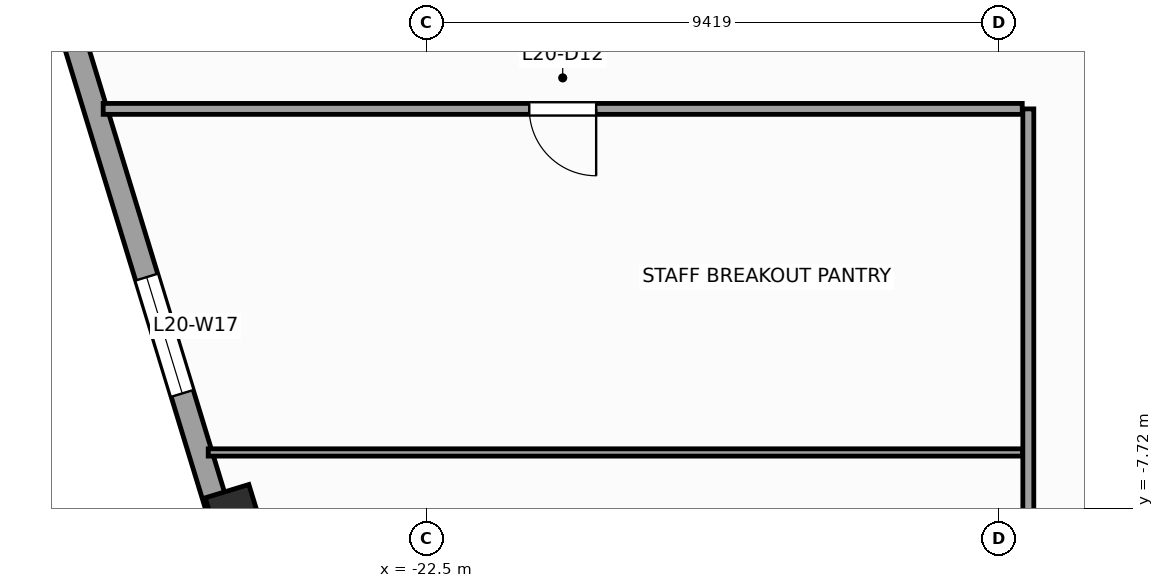
"""IFC4 building model, lengths in metres.
Left out: names, types, materials, properties, quantities, classifications, styles, units other than length and angle.
Written with IfcOpenShell. Run it as: python <this file> out.ifc"""

import sys

from ifc_helpers import new_model, si_unit, direction, frame, frame_2d, origin, origin_2d, place, context, subcontext, project, spatial, rectangle, extrude, source, transform, mapped, element, fill, save


model = new_model("IFC4")
c1 = context("Model", 3, precision=1e-05, world=origin(), true_north=direction((0.0, 1.0)))
c2 = subcontext(c1, "Body", "Model", "MODEL_VIEW")
j1 = project(units=[si_unit("LENGTHUNIT", "METRE"), si_unit("PLANEANGLEUNIT", "RADIAN")], contexts=[c1])
p1 = place(None, origin())
s1 = spatial("IfcSite", under=j1, at=p1, CompositionType="ELEMENT")
p2 = place(p1, origin())
s2 = spatial("IfcBuilding", under=s1, at=p2, CompositionType="ELEMENT")
p3 = place(p2, frame((0.0, 0.0, 87.2)))
s3 = spatial("IfcBuildingStorey", under=s2, at=p3, CompositionType="ELEMENT", Elevation=87.2)
m1 = source(origin(), c2, "Body", "SweptSolid", [
    extrude(rectangle(XDim=0.75, YDim=0.85, at=origin_2d()), origin(), (0.0, 0.0, 1.0), 4.0),
])
p4 = place(p3, frame((-25.653, -7.843, 0.0), z_axis=(0.0, 0.0, 1.0), x_axis=(0.956304755963, 0.292371704723, 0.0)))
e1 = element("IfcColumn", 1, at=p4, inside=s3, PredefinedType="COLUMN", context=c2, shape_type="MappedRepresentation", body=[
    mapped(m1, transform((0.0, 0.0, 0.0), scale=1.0)),
])
p5 = place(p3, frame((-32.658, 14.265, 0.0), z_axis=(0.0, 0.0, 1.0), x_axis=(0.292373127906, -0.956304320851, 0.0)))
e2 = element("IfcWall", 2, at=p5, inside=s3, PredefinedType="STANDARD", context=c2, shape_type="SweptSolid", body=[
    extrude(rectangle(XDim=46.38, YDim=0.38, at=frame_2d((23.19, 0.0))), origin(), (0.0, 0.0, 1.0), 3.14),
])
p6 = place(p5, frame((4.865, 0.0, 0.51)))
e3 = element("IfcOpeningElement", 3, at=p6, cuts=e2, PredefinedType="OPENING", context=c2, shape_type="SweptSolid", body=[
    extrude(rectangle(XDim=1.4, YDim=2.4, at=frame_2d((0.7, 1.2))), frame((0.0, 0.2, 0.0), z_axis=(0.0, -1.0, 0.0), x_axis=(1.0, 0.0, 0.0)), (0.0, 0.0, 1.0), 0.4),
])
p7 = place(p5, frame((10.95, 0.0, 0.51)))
e4 = element("IfcOpeningElement", 4, at=p7, cuts=e2, PredefinedType="OPENING", context=c2, shape_type="SweptSolid", body=[
    extrude(rectangle(XDim=2.0, YDim=2.4, at=frame_2d((1.0, 1.2))), frame((0.0, 0.2, 0.0), z_axis=(0.0, -1.0, 0.0), x_axis=(1.0, 0.0, 0.0)), (0.0, 0.0, 1.0), 0.4),
])
p8 = place(p5, frame((19.012, 0.0, 0.51)))
e5 = element("IfcOpeningElement", 5, at=p8, cuts=e2, PredefinedType="OPENING", context=c2, shape_type="SweptSolid", body=[
    extrude(rectangle(XDim=2.0, YDim=2.4, at=frame_2d((1.0, 1.2))), frame((0.0, 0.2, 0.0), z_axis=(0.0, -1.0, 0.0), x_axis=(1.0, 0.0, 0.0)), (0.0, 0.0, 1.0), 0.4),
])
p9 = place(p5, frame((30.538, 0.0, 0.51)))
e6 = element("IfcOpeningElement", 6, at=p9, cuts=e2, PredefinedType="OPENING", context=c2, shape_type="SweptSolid", body=[
    extrude(rectangle(XDim=2.0, YDim=2.4, at=frame_2d((1.0, 1.2))), frame((0.0, 0.2, 0.0), z_axis=(0.0, -1.0, 0.0), x_axis=(1.0, 0.0, 0.0)), (0.0, 0.0, 1.0), 0.4),
])
p10 = place(p5, frame((39.187, 0.0, 0.51)))
e7 = element("IfcOpeningElement", 7, at=p10, cuts=e2, PredefinedType="OPENING", context=c2, shape_type="SweptSolid", body=[
    extrude(rectangle(XDim=1.4, YDim=2.4, at=frame_2d((0.7, 1.2))), frame((0.0, 0.2, 0.0), z_axis=(0.0, -1.0, 0.0), x_axis=(1.0, 0.0, 0.0)), (0.0, 0.0, 1.0), 0.4),
])
p11 = place(p3, frame((-12.6, -12.6, 0.0), z_axis=(0.0, 0.0, 1.0), x_axis=(0.0, 1.0, 0.0)))
e8 = element("IfcWall", 8, at=p11, inside=s3, PredefinedType="PARTITIONING", context=c2, shape_type="SweptSolid", body=[
    extrude(rectangle(XDim=11.45, YDim=0.18, at=frame_2d((5.725, 0.0))), origin(), (0.0, 0.0, 1.0), 3.74),
])
p12 = place(p11, frame((2.514, 0.0, 0.0)))
e9 = element("IfcOpeningElement", 9, at=p12, cuts=e8, PredefinedType="OPENING", context=c2, shape_type="SweptSolid", body=[
    extrude(rectangle(XDim=1.1, YDim=2.2, at=frame_2d((0.55, 1.1))), frame((0.0, 0.1, 0.0), z_axis=(0.0, -1.0, 0.0), x_axis=(1.0, 0.0, 0.0)), (0.0, 0.0, 1.0), 0.2),
])
p13 = place(p3, frame((-27.814, -1.15, 0.0), z_axis=(0.0, 0.0, 1.0), x_axis=(1.0, 0.0, 0.0)))
e10 = element("IfcWall", 10, at=p13, inside=s3, PredefinedType="PARTITIONING", context=c2, shape_type="SweptSolid", body=[
    extrude(rectangle(XDim=15.114, YDim=0.18, at=frame_2d((7.557, 0.0))), origin(), (0.0, 0.0, 1.0), 3.74),
])
p14 = place(p13, frame((7.007, 0.0, 0.0)))
e11 = element("IfcOpeningElement", 11, at=p14, cuts=e10, PredefinedType="OPENING", context=c2, shape_type="SweptSolid", body=[
    extrude(rectangle(XDim=1.1, YDim=2.2, at=frame_2d((0.55, 1.1))), frame((0.0, 0.1, 0.0), z_axis=(0.0, -1.0, 0.0), x_axis=(1.0, 0.0, 0.0)), (0.0, 0.0, 1.0), 0.2),
])
p15 = place(p3, frame((-26.087, -6.8, 0.0), z_axis=(0.0, 0.0, 1.0), x_axis=(1.0, 0.0, 0.0)))
e12 = element("IfcWall", 12, at=p15, inside=s3, PredefinedType="PARTITIONING", context=c2, shape_type="SweptSolid", body=[
    extrude(rectangle(XDim=13.392, YDim=0.12, at=frame_2d((6.696, 0.0))), origin(), (0.0, 0.0, 1.0), 3.74),
])
m2 = source(origin(), c2, "Body", "SweptSolid", [
    extrude(rectangle(XDim=2.0, YDim=2.4, at=frame_2d((1.0, 1.2))), frame((0.0, 0.03, 0.0), z_axis=(0.0, -1.0, 0.0), x_axis=(1.0, 0.0, 0.0)), (0.0, 0.0, 1.0), 0.06),
])
p16 = place(p8, origin())
e13 = element("IfcWindow", 13, at=p16, inside=s3, PartitioningType="SINGLE_PANEL", PredefinedType="WINDOW", context=c2, shape_type="MappedRepresentation", body=[
    mapped(m2, transform((0.0, 0.0, 0.0), scale=1.0)),
])
fill(e5, e13)
m3 = source(origin(), c2, "Body", "SweptSolid", [
    extrude(rectangle(XDim=1.1, YDim=2.2, at=frame_2d((0.55, 1.1))), frame((0.0, 0.025, 0.0), z_axis=(0.0, -1.0, 0.0), x_axis=(1.0, 0.0, 0.0)), (0.0, 0.0, 1.0), 0.05),
])
p17 = place(p14, frame((1.1, 0.0, 0.0), z_axis=(0.0, 0.0, 1.0), x_axis=(-1.0, 0.0, 0.0)))
e14 = element("IfcDoor", 14, at=p17, inside=s3, OperationType="SINGLE_SWING_RIGHT", PredefinedType="DOOR", context=c2, shape_type="MappedRepresentation", body=[
    mapped(m3, transform((0.0, 0.0, 0.0), scale=1.0)),
])
fill(e11, e14)
save(model, sys.argv[1])
